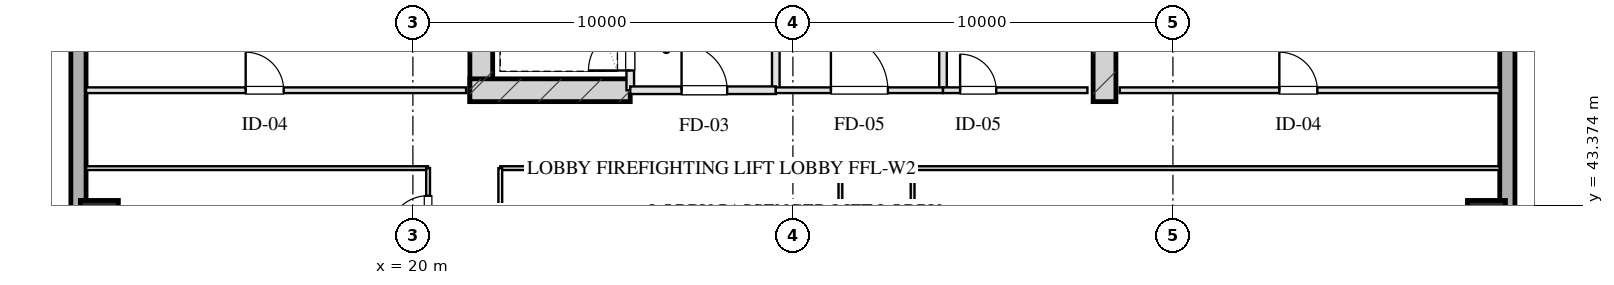
"""IFC4 building model, lengths in metres.
Left out: names, types, materials, properties, quantities, classifications, styles, units other than length and angle.
Written with IfcOpenShell. Run it as: python <this file> out.ifc"""

import sys

from ifc_helpers import new_model, si_unit, direction, frame, frame_2d, origin, origin_2d, place, context, subcontext, project, spatial, rectangle, hollow_rectangle, extrude, element, fill, save


model = new_model("IFC4")
c1 = context("Model", 3, precision=1e-05, world=origin(), true_north=direction((0.0, 1.0)))
c2 = subcontext(c1, "Body", "Model", "MODEL_VIEW")
j1 = project(units=[si_unit("LENGTHUNIT", "METRE"), si_unit("PLANEANGLEUNIT", "RADIAN")], contexts=[c1])
p1 = place(None, origin())
s1 = spatial("IfcSite", under=j1, at=p1, CompositionType="ELEMENT")
p2 = place(p1, origin())
s2 = spatial("IfcBuilding", under=s1, at=p2, CompositionType="ELEMENT")
p3 = place(p2, frame((0.0, 0.0, 149.5)))
s3 = spatial("IfcBuildingStorey", under=s2, at=p3, CompositionType="ELEMENT", Elevation=149.5)
for number, where, z_axis, x_axis in (
    (1, (21.8, 46.1, 0.0), (0.0, 0.0, 1.0), (0.0, 1.0, 0.0)),
    (2, (38.2, 46.1, 0.0), (0.0, 0.0, 1.0), (0.0, 1.0, 0.0)),
):
    element("IfcWall", number, at=place(p3, frame(where, z_axis=z_axis, x_axis=x_axis)), inside=s3, PredefinedType="SHEAR", context=c2, shape_type="SweptSolid", body=[
        extrude(rectangle(XDim=9.48, YDim=0.6, at=frame_2d((4.74, 0.0))), origin(), (0.0, 0.0, 1.0), 3.45),
    ])
p4 = place(p3, frame((21.5, 46.4, 0.0), z_axis=(0.0, 0.0, 1.0), x_axis=(1.0, 0.0, 0.0)))
e3 = element("IfcWall", 3, at=p4, inside=s3, PredefinedType="SHEAR", context=c2, shape_type="SweptSolid", body=[
    extrude(rectangle(XDim=4.22, YDim=0.6, at=frame_2d((2.11, 0.0))), origin(), (0.0, 0.0, 1.0), 3.45),
])
for number, where, z_axis, x_axis in (
    (4, (11.75, 43.0, 0.0), (0.0, 0.0, 1.0), (1.0, 0.0, 0.0)),
    (5, (48.25, 43.0, 0.0), (0.0, 0.0, 1.0), (1.0, 0.0, 0.0)),
):
    element("IfcColumn", number, at=place(p3, frame(where, z_axis=z_axis, x_axis=x_axis)), inside=s3, PredefinedType="COLUMN", context=c2, shape_type="SweptSolid", body=[
        extrude(hollow_rectangle(XDim=1.0, YDim=1.0, WallThickness=0.036, at=origin_2d()), origin(), (0.0, 0.0, 1.0), 3.451),
    ])
p5 = place(p3, frame((11.2, 9.0, 0.0), z_axis=(0.0, 0.0, 1.0), x_axis=(0.0, 1.0, 0.0)))
e6 = element("IfcWall", 6, at=p5, inside=s3, PredefinedType="SOLIDWALL", context=c2, shape_type="SweptSolid", body=[
    extrude(rectangle(XDim=50.0, YDim=0.4, at=frame_2d((25.0, 0.0))), origin(), (0.0, 0.0, 1.0), 2.61),
])
p6 = place(p3, frame((48.8, 59.0, 0.0), z_axis=(0.0, 0.0, 1.0), x_axis=(0.0, -1.0, 0.0)))
e7 = element("IfcWall", 7, at=p6, inside=s3, PredefinedType="SOLIDWALL", context=c2, shape_type="SweptSolid", body=[
    extrude(rectangle(XDim=50.0, YDim=0.4, at=frame_2d((25.0, 0.0))), origin(), (0.0, 0.0, 1.0), 2.61),
])
p7 = place(p6, frame((30.275, 0.0, 0.75)))
e8 = element("IfcOpeningElement", 8, at=p7, cuts=e7, PredefinedType="OPENING", context=c2, shape_type="SweptSolid", body=[
    extrude(rectangle(XDim=2.25, YDim=1.46, at=frame_2d((1.125, 0.73))), frame((0.0, 0.21, 0.0), z_axis=(0.0, -1.0, 0.0), x_axis=(1.0, 0.0, 0.0)), (0.0, 0.0, 1.0), 0.42),
])
p8 = place(p6, frame((17.475, 0.0, 0.75)))
e9 = element("IfcOpeningElement", 9, at=p8, cuts=e7, PredefinedType="OPENING", context=c2, shape_type="SweptSolid", body=[
    extrude(rectangle(XDim=2.25, YDim=1.46, at=frame_2d((1.125, 0.73))), frame((0.0, 0.21, 0.0), z_axis=(0.0, -1.0, 0.0), x_axis=(1.0, 0.0, 0.0)), (0.0, 0.0, 1.0), 0.42),
])
p9 = place(p3, frame((25.72, 46.4, 0.0), z_axis=(0.0, 0.0, 1.0), x_axis=(0.0, 1.0, 0.0)))
e10 = element("IfcWall", 10, at=p9, inside=s3, PredefinedType="PARTITIONING", context=c2, shape_type="SweptSolid", body=[
    extrude(rectangle(XDim=1.9, YDim=0.2, at=frame_2d((0.95, 0.0))), origin(), (0.0, 0.0, 1.0), 3.175),
])
p10 = place(p9, frame((0.52, 0.0, 0.0)))
e11 = element("IfcOpeningElement", 11, at=p10, cuts=e10, PredefinedType="OPENING", context=c2, shape_type="SweptSolid", body=[
    extrude(rectangle(XDim=1.1, YDim=2.05, at=frame_2d((0.55, 1.025))), frame((0.0, 0.11, 0.0), z_axis=(0.0, -1.0, 0.0), x_axis=(1.0, 0.0, 0.0)), (0.0, 0.0, 1.0), 0.22),
])
p11 = place(p3, frame((29.55, 46.4, 0.0), z_axis=(0.0, 0.0, 1.0), x_axis=(0.0, 1.0, 0.0)))
e12 = element("IfcWall", 12, at=p11, inside=s3, PredefinedType="PARTITIONING", context=c2, shape_type="SweptSolid", body=[
    extrude(rectangle(XDim=8.43, YDim=0.2, at=frame_2d((4.215, 0.0))), origin(), (0.0, 0.0, 1.0), 3.175),
])
p12 = place(p3, frame((25.72, 46.4, 0.0), z_axis=(0.0, 0.0, 1.0), x_axis=(1.0, 0.0, 0.0)))
e13 = element("IfcWall", 13, at=p12, inside=s3, PredefinedType="PARTITIONING", context=c2, shape_type="SweptSolid", body=[
    extrude(rectangle(XDim=3.83, YDim=0.2, at=frame_2d((1.915, 0.0))), origin(), (0.0, 0.0, 1.0), 3.175),
])
p13 = place(p12, frame((1.35, 0.0, 0.0)))
e14 = element("IfcOpeningElement", 14, at=p13, cuts=e13, PredefinedType="OPENING", context=c2, shape_type="SweptSolid", body=[
    extrude(rectangle(XDim=1.2, YDim=2.05, at=frame_2d((0.6, 1.025))), frame((0.0, 0.11, 0.0), z_axis=(0.0, -1.0, 0.0), x_axis=(1.0, 0.0, 0.0)), (0.0, 0.0, 1.0), 0.22),
])
p14 = place(p3, frame((33.95, 46.4, 0.0), z_axis=(0.0, 0.0, 1.0), x_axis=(0.0, 1.0, 0.0)))
e15 = element("IfcWall", 15, at=p14, inside=s3, PredefinedType="PARTITIONING", context=c2, shape_type="SweptSolid", body=[
    extrude(rectangle(XDim=8.43, YDim=0.2, at=frame_2d((4.215, 0.0))), origin(), (0.0, 0.0, 1.0), 3.175),
])
p15 = place(p3, frame((29.55, 46.4, 0.0), z_axis=(0.0, 0.0, 1.0), x_axis=(1.0, 0.0, 0.0)))
e16 = element("IfcWall", 16, at=p15, inside=s3, PredefinedType="PARTITIONING", context=c2, shape_type="SweptSolid", body=[
    extrude(rectangle(XDim=4.4, YDim=0.15, at=frame_2d((2.2, 0.0))), origin(), (0.0, 0.0, 1.0), 3.175),
])
p16 = place(p15, frame((1.45, 0.0, 0.0)))
e17 = element("IfcOpeningElement", 17, at=p16, cuts=e16, PredefinedType="OPENING", context=c2, shape_type="SweptSolid", body=[
    extrude(rectangle(XDim=1.5, YDim=2.05, at=frame_2d((0.75, 1.025))), frame((0.0, 0.085, 0.0), z_axis=(0.0, -1.0, 0.0), x_axis=(1.0, 0.0, 0.0)), (0.0, 0.0, 1.0), 0.17),
])
p17 = place(p3, frame((33.95, 46.4, 0.0), z_axis=(0.0, 0.0, 1.0), x_axis=(1.0, 0.0, 0.0)))
e18 = element("IfcWall", 18, at=p17, inside=s3, PredefinedType="PARTITIONING", context=c2, shape_type="SweptSolid", body=[
    extrude(rectangle(XDim=3.8, YDim=0.15, at=frame_2d((1.9, 0.0))), origin(), (0.0, 0.0, 1.0), 3.175),
])
p18 = place(p17, frame((0.45, 0.0, 0.0)))
e19 = element("IfcOpeningElement", 19, at=p18, cuts=e18, PredefinedType="OPENING", context=c2, shape_type="SweptSolid", body=[
    extrude(rectangle(XDim=0.95, YDim=2.05, at=frame_2d((0.475, 1.025))), frame((0.0, 0.085, 0.0), z_axis=(0.0, -1.0, 0.0), x_axis=(1.0, 0.0, 0.0)), (0.0, 0.0, 1.0), 0.17),
])
p19 = place(p3, frame((11.4, 46.4, 0.0), z_axis=(0.0, 0.0, 1.0), x_axis=(1.0, 0.0, 0.0)))
e20 = element("IfcWall", 20, at=p19, inside=s3, PredefinedType="PARTITIONING", context=c2, shape_type="SweptSolid", body=[
    extrude(rectangle(XDim=10.0, YDim=0.15, at=frame_2d((5.0, 0.0))), origin(), (0.0, 0.0, 1.0), 3.175),
])
p20 = place(p19, frame((4.2, 0.0, 0.0)))
e21 = element("IfcOpeningElement", 21, at=p20, cuts=e20, PredefinedType="OPENING", context=c2, shape_type="SweptSolid", body=[
    extrude(rectangle(XDim=1.0, YDim=2.05, at=frame_2d((0.5, 1.025))), frame((0.0, 0.085, 0.0), z_axis=(0.0, -1.0, 0.0), x_axis=(1.0, 0.0, 0.0)), (0.0, 0.0, 1.0), 0.17),
])
p21 = place(p3, frame((38.6, 46.4, 0.0), z_axis=(0.0, 0.0, 1.0), x_axis=(1.0, 0.0, 0.0)))
e22 = element("IfcWall", 22, at=p21, inside=s3, PredefinedType="PARTITIONING", context=c2, shape_type="SweptSolid", body=[
    extrude(rectangle(XDim=10.0, YDim=0.15, at=frame_2d((5.0, 0.0))), origin(), (0.0, 0.0, 1.0), 3.175),
])
p22 = place(p21, frame((4.2, 0.0, 0.0)))
e23 = element("IfcOpeningElement", 23, at=p22, cuts=e22, PredefinedType="OPENING", context=c2, shape_type="SweptSolid", body=[
    extrude(rectangle(XDim=1.0, YDim=2.05, at=frame_2d((0.5, 1.025))), frame((0.0, 0.085, 0.0), z_axis=(0.0, -1.0, 0.0), x_axis=(1.0, 0.0, 0.0)), (0.0, 0.0, 1.0), 0.17),
])
p23 = place(p3, frame((11.4, 44.35, 0.0), z_axis=(0.0, 0.0, 1.0), x_axis=(1.0, 0.0, 0.0)))
e24 = element("IfcWall", 24, at=p23, inside=s3, PredefinedType="MOVABLE", context=c2, shape_type="SweptSolid", body=[
    extrude(rectangle(XDim=9.0, YDim=0.1, at=frame_2d((4.5, 0.0))), origin(), (0.0, 0.0, 1.0), 3.175),
])
p24 = place(p3, frame((22.3, 44.35, 0.0), z_axis=(0.0, 0.0, 1.0), x_axis=(1.0, 0.0, 0.0)))
e25 = element("IfcWall", 25, at=p24, inside=s3, PredefinedType="MOVABLE", context=c2, shape_type="SweptSolid", body=[
    extrude(rectangle(XDim=8.95, YDim=0.1, at=frame_2d((4.475, 0.0))), origin(), (0.0, 0.0, 1.0), 3.175),
])
p25 = place(p3, frame((33.15, 44.35, 0.0), z_axis=(0.0, 0.0, 1.0), x_axis=(1.0, 0.0, 0.0)))
e26 = element("IfcWall", 26, at=p25, inside=s3, PredefinedType="MOVABLE", context=c2, shape_type="SweptSolid", body=[
    extrude(rectangle(XDim=15.45, YDim=0.1, at=frame_2d((7.725, 0.0))), origin(), (0.0, 0.0, 1.0), 3.175),
])
p26 = place(p3, frame((20.4, 23.65, 0.0), z_axis=(0.0, 0.0, 1.0), x_axis=(0.0, 1.0, 0.0)))
e27 = element("IfcWall", 27, at=p26, inside=s3, PredefinedType="MOVABLE", context=c2, shape_type="SweptSolid", body=[
    extrude(rectangle(XDim=20.7, YDim=0.1, at=frame_2d((10.35, 0.0))), origin(), (0.0, 0.0, 1.0), 3.175),
])
p27 = place(p26, frame((0.775, 0.0, 0.0)))
e28 = element("IfcOpeningElement", 28, at=p27, cuts=e27, PredefinedType="OPENING", context=c2, shape_type="SweptSolid", body=[
    extrude(rectangle(XDim=1.0, YDim=2.05, at=frame_2d((0.5, 1.025))), frame((0.0, 0.06, 0.0), z_axis=(0.0, -1.0, 0.0), x_axis=(1.0, 0.0, 0.0)), (0.0, 0.0, 1.0), 0.12),
])
p28 = place(p26, frame((5.35, 0.0, 0.0)))
e29 = element("IfcOpeningElement", 29, at=p28, cuts=e27, PredefinedType="OPENING", context=c2, shape_type="SweptSolid", body=[
    extrude(rectangle(XDim=0.85, YDim=2.05, at=frame_2d((0.425, 1.025))), frame((0.0, 0.06, 0.0), z_axis=(0.0, -1.0, 0.0), x_axis=(1.0, 0.0, 0.0)), (0.0, 0.0, 1.0), 0.12),
])
p29 = place(p26, frame((9.85, 0.0, 0.0)))
e30 = element("IfcOpeningElement", 30, at=p29, cuts=e27, PredefinedType="OPENING", context=c2, shape_type="SweptSolid", body=[
    extrude(rectangle(XDim=1.0, YDim=2.05, at=frame_2d((0.5, 1.025))), frame((0.0, 0.06, 0.0), z_axis=(0.0, -1.0, 0.0), x_axis=(1.0, 0.0, 0.0)), (0.0, 0.0, 1.0), 0.12),
])
p30 = place(p26, frame((14.35, 0.0, 0.0)))
e31 = element("IfcOpeningElement", 31, at=p30, cuts=e27, PredefinedType="OPENING", context=c2, shape_type="SweptSolid", body=[
    extrude(rectangle(XDim=1.0, YDim=2.05, at=frame_2d((0.5, 1.025))), frame((0.0, 0.06, 0.0), z_axis=(0.0, -1.0, 0.0), x_axis=(1.0, 0.0, 0.0)), (0.0, 0.0, 1.0), 0.12),
])
p31 = place(p26, frame((18.925, 0.0, 0.0)))
e32 = element("IfcOpeningElement", 32, at=p31, cuts=e27, PredefinedType="OPENING", context=c2, shape_type="SweptSolid", body=[
    extrude(rectangle(XDim=1.05, YDim=2.05, at=frame_2d((0.525, 1.025))), frame((0.0, 0.06, 0.0), z_axis=(0.0, -1.0, 0.0), x_axis=(1.0, 0.0, 0.0)), (0.0, 0.0, 1.0), 0.12),
])
p32 = place(p3, frame((22.3, 23.65, 0.0), z_axis=(0.0, 0.0, 1.0), x_axis=(0.0, 1.0, 0.0)))
e33 = element("IfcWall", 33, at=p32, inside=s3, PredefinedType="MOVABLE", context=c2, shape_type="SweptSolid", body=[
    extrude(rectangle(XDim=20.7, YDim=0.1, at=frame_2d((10.35, 0.0))), origin(), (0.0, 0.0, 1.0), 3.175),
])
p33 = place(p32, frame((2.857, 0.0, 0.0)))
e34 = element("IfcOpeningElement", 34, at=p33, cuts=e33, PredefinedType="OPENING", context=c2, shape_type="SweptSolid", body=[
    extrude(rectangle(XDim=1.1, YDim=2.05, at=frame_2d((0.55, 1.025))), frame((0.0, 0.06, 0.0), z_axis=(0.0, -1.0, 0.0), x_axis=(1.0, 0.0, 0.0)), (0.0, 0.0, 1.0), 0.12),
])
p34 = place(p32, frame((17.208, 0.0, 0.0)))
e35 = element("IfcOpeningElement", 35, at=p34, cuts=e33, PredefinedType="OPENING", context=c2, shape_type="SweptSolid", body=[
    extrude(rectangle(XDim=1.1, YDim=2.05, at=frame_2d((0.55, 1.025))), frame((0.0, 0.06, 0.0), z_axis=(0.0, -1.0, 0.0), x_axis=(1.0, 0.0, 0.0)), (0.0, 0.0, 1.0), 0.12),
])
p35 = place(p3, frame((31.25, 23.65, 0.0), z_axis=(0.0, 0.0, 1.0), x_axis=(0.0, 1.0, 0.0)))
e36 = element("IfcWall", 36, at=p35, inside=s3, PredefinedType="MOVABLE", context=c2, shape_type="SweptSolid", body=[
    extrude(rectangle(XDim=20.7, YDim=0.1, at=frame_2d((10.35, 0.0))), origin(), (0.0, 0.0, 1.0), 3.175),
])
p36 = place(p35, frame((9.71, 0.0, 0.0)))
e37 = element("IfcOpeningElement", 37, at=p36, cuts=e36, PredefinedType="OPENING", context=c2, shape_type="SweptSolid", body=[
    extrude(rectangle(XDim=1.1, YDim=2.05, at=frame_2d((0.55, 1.025))), frame((0.0, 0.06, 0.0), z_axis=(0.0, -1.0, 0.0), x_axis=(1.0, 0.0, 0.0)), (0.0, 0.0, 1.0), 0.12),
])
p37 = place(p3, frame((33.15, 23.65, 0.0), z_axis=(0.0, 0.0, 1.0), x_axis=(0.0, 1.0, 0.0)))
e38 = element("IfcWall", 38, at=p37, inside=s3, PredefinedType="MOVABLE", context=c2, shape_type="SweptSolid", body=[
    extrude(rectangle(XDim=20.7, YDim=0.1, at=frame_2d((10.35, 0.0))), origin(), (0.0, 0.0, 1.0), 3.175),
])
p38 = place(p37, frame((2.667, 0.0, 0.0)))
e39 = element("IfcOpeningElement", 39, at=p38, cuts=e38, PredefinedType="OPENING", context=c2, shape_type="SweptSolid", body=[
    extrude(rectangle(XDim=1.0, YDim=2.05, at=frame_2d((0.5, 1.025))), frame((0.0, 0.06, 0.0), z_axis=(0.0, -1.0, 0.0), x_axis=(1.0, 0.0, 0.0)), (0.0, 0.0, 1.0), 0.12),
])
p39 = place(p37, frame((9.843, 0.0, 0.0)))
e40 = element("IfcOpeningElement", 40, at=p39, cuts=e38, PredefinedType="OPENING", context=c2, shape_type="SweptSolid", body=[
    extrude(rectangle(XDim=1.0, YDim=2.05, at=frame_2d((0.5, 1.025))), frame((0.0, 0.06, 0.0), z_axis=(0.0, -1.0, 0.0), x_axis=(1.0, 0.0, 0.0)), (0.0, 0.0, 1.0), 0.12),
])
p40 = place(p37, frame((17.025, 0.0, 0.0)))
e41 = element("IfcOpeningElement", 41, at=p40, cuts=e38, PredefinedType="OPENING", context=c2, shape_type="SweptSolid", body=[
    extrude(rectangle(XDim=1.0, YDim=2.05, at=frame_2d((0.5, 1.025))), frame((0.0, 0.06, 0.0), z_axis=(0.0, -1.0, 0.0), x_axis=(1.0, 0.0, 0.0)), (0.0, 0.0, 1.0), 0.12),
])
p41 = place(p10, origin())
e42 = element("IfcDoor", 42, at=p41, inside=s3, OperationType="SINGLE_SWING_LEFT", PredefinedType="DOOR", context=c2, shape_type="SweptSolid", body=[
    extrude(rectangle(XDim=1.1, YDim=2.05, at=frame_2d((0.55, 1.025))), frame((0.0, 0.025, 0.0), z_axis=(0.0, -1.0, 0.0), x_axis=(1.0, 0.0, 0.0)), (0.0, 0.0, 1.0), 0.05),
])
fill(e11, e42)
p42 = place(p13, origin())
e43 = element("IfcDoor", 43, at=p42, inside=s3, OperationType="SINGLE_SWING_LEFT", PredefinedType="DOOR", context=c2, shape_type="SweptSolid", body=[
    extrude(rectangle(XDim=1.2, YDim=2.05, at=frame_2d((0.6, 1.025))), frame((0.0, 0.025, 0.0), z_axis=(0.0, -1.0, 0.0), x_axis=(1.0, 0.0, 0.0)), (0.0, 0.0, 1.0), 0.05),
])
fill(e14, e43)
p43 = place(p16, origin())
e44 = element("IfcDoor", 44, at=p43, inside=s3, OperationType="SINGLE_SWING_LEFT", PredefinedType="DOOR", context=c2, shape_type="SweptSolid", body=[
    extrude(rectangle(XDim=1.5, YDim=2.05, at=frame_2d((0.75, 1.025))), frame((0.0, 0.025, 0.0), z_axis=(0.0, -1.0, 0.0), x_axis=(1.0, 0.0, 0.0)), (0.0, 0.0, 1.0), 0.05),
])
fill(e17, e44)
p44 = place(p18, origin())
e45 = element("IfcDoor", 45, at=p44, inside=s3, OperationType="SINGLE_SWING_LEFT", PredefinedType="DOOR", context=c2, shape_type="SweptSolid", body=[
    extrude(rectangle(XDim=0.95, YDim=2.05, at=frame_2d((0.475, 1.025))), frame((0.0, 0.025, 0.0), z_axis=(0.0, -1.0, 0.0), x_axis=(1.0, 0.0, 0.0)), (0.0, 0.0, 1.0), 0.05),
])
fill(e19, e45)
p45 = place(p20, origin())
e46 = element("IfcDoor", 46, at=p45, inside=s3, OperationType="SINGLE_SWING_LEFT", PredefinedType="DOOR", context=c2, shape_type="SweptSolid", body=[
    extrude(rectangle(XDim=1.0, YDim=2.05, at=frame_2d((0.5, 1.025))), frame((0.0, 0.025, 0.0), z_axis=(0.0, -1.0, 0.0), x_axis=(1.0, 0.0, 0.0)), (0.0, 0.0, 1.0), 0.05),
])
fill(e21, e46)
p46 = place(p22, origin())
e47 = element("IfcDoor", 47, at=p46, inside=s3, OperationType="SINGLE_SWING_LEFT", PredefinedType="DOOR", context=c2, shape_type="SweptSolid", body=[
    extrude(rectangle(XDim=1.0, YDim=2.05, at=frame_2d((0.5, 1.025))), frame((0.0, 0.025, 0.0), z_axis=(0.0, -1.0, 0.0), x_axis=(1.0, 0.0, 0.0)), (0.0, 0.0, 1.0), 0.05),
])
fill(e23, e47)
p47 = place(p31, origin())
e48 = element("IfcDoor", 48, at=p47, inside=s3, OperationType="SINGLE_SWING_LEFT", PredefinedType="DOOR", context=c2, shape_type="SweptSolid", body=[
    extrude(rectangle(XDim=1.05, YDim=2.05, at=frame_2d((0.525, 1.025))), frame((0.0, 0.025, 0.0), z_axis=(0.0, -1.0, 0.0), x_axis=(1.0, 0.0, 0.0)), (0.0, 0.0, 1.0), 0.05),
])
fill(e32, e48)
save(model, sys.argv[1])
